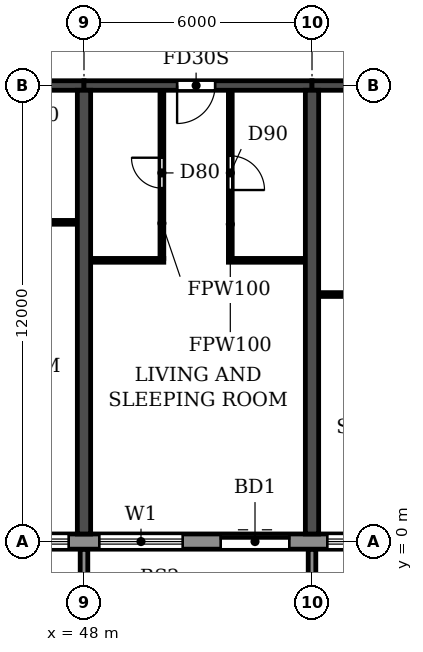
"""IFC4 building model, lengths in metres.
Left out: names, types, materials, properties, quantities, classifications, styles, units other than length and angle.
Written with IfcOpenShell. Run it as: python <this file> out.ifc"""

import sys

from ifc_helpers import new_model, si_unit, direction, frame, frame_2d, origin, place, context, subcontext, project, spatial, polyline, rectangle, outline, extrude, source, transform, mapped, element, fill, save


model = new_model("IFC4")
c1 = context("Model", 3, precision=1e-05, world=origin(), true_north=direction((0.0, 1.0)))
c2 = subcontext(c1, "Body", "Model", "MODEL_VIEW")
j1 = project(units=[si_unit("LENGTHUNIT", "METRE"), si_unit("PLANEANGLEUNIT", "RADIAN")], contexts=[c1])
p1 = place(None, origin())
s1 = spatial("IfcSite", under=j1, at=p1, CompositionType="ELEMENT")
p2 = place(p1, origin())
s2 = spatial("IfcBuilding", under=s1, at=p2, CompositionType="ELEMENT")
p3 = place(p2, frame((0.0, 0.0, 82.8)))
s3 = spatial("IfcBuildingStorey", under=s2, at=p3, CompositionType="ELEMENT", Elevation=82.8)
for number, where, z_axis, x_axis in (
    (1, (48.0, 0.2, 0.0), (0.0, 0.0, 1.0), (0.0, 1.0, 0.0)),
    (2, (54.0, 0.2, 0.0), (0.0, 0.0, 1.0), (0.0, 1.0, 0.0)),
):
    element("IfcWall", number, at=place(p3, frame(where, z_axis=z_axis, x_axis=x_axis)), inside=s3, PredefinedType="SHEAR", context=c2, shape_type="SweptSolid", body=[
        extrude(rectangle(XDim=11.675, YDim=0.35, at=frame_2d((5.837, 0.0))), origin(), (0.0, 0.0, 1.0), 3.06),
    ])
p4 = place(p3, frame((42.0, 12.0, 0.0), z_axis=(0.0, 0.0, 1.0), x_axis=(1.0, 0.0, 0.0)))
e3 = element("IfcWall", 3, at=p4, inside=s3, PredefinedType="SHEAR", context=c2, shape_type="SweptSolid", body=[
    extrude(rectangle(XDim=6.0, YDim=0.25, at=frame_2d((3.0, 0.0))), origin(), (0.0, 0.0, 1.0), 2.46),
])
p5 = place(p4, frame((2.45, 0.0, 0.0)))
e4 = element("IfcOpeningElement", 4, at=p5, cuts=e3, PredefinedType="OPENING", context=c2, shape_type="SweptSolid", body=[
    extrude(rectangle(XDim=1.0, YDim=2.1, at=frame_2d((0.5, 1.05))), frame((0.0, 0.135, 0.0), z_axis=(0.0, -1.0, 0.0), x_axis=(1.0, 0.0, 0.0)), (0.0, 0.0, 1.0), 0.27),
])
p6 = place(p3, frame((48.0, 12.0, 0.0), z_axis=(0.0, 0.0, 1.0), x_axis=(1.0, 0.0, 0.0)))
e5 = element("IfcWall", 5, at=p6, inside=s3, PredefinedType="SHEAR", context=c2, shape_type="SweptSolid", body=[
    extrude(rectangle(XDim=6.0, YDim=0.25, at=frame_2d((3.0, 0.0))), origin(), (0.0, 0.0, 1.0), 2.46),
])
p7 = place(p6, frame((2.45, 0.0, 0.0)))
e6 = element("IfcOpeningElement", 6, at=p7, cuts=e5, PredefinedType="OPENING", context=c2, shape_type="SweptSolid", body=[
    extrude(rectangle(XDim=1.0, YDim=2.1, at=frame_2d((0.5, 1.05))), frame((0.0, 0.135, 0.0), z_axis=(0.0, -1.0, 0.0), x_axis=(1.0, 0.0, 0.0)), (0.0, 0.0, 1.0), 0.27),
])
p8 = place(p3, frame((54.0, 12.0, 0.0), z_axis=(0.0, 0.0, 1.0), x_axis=(1.0, 0.0, 0.0)))
e7 = element("IfcWall", 7, at=p8, inside=s3, PredefinedType="SHEAR", context=c2, shape_type="SweptSolid", body=[
    extrude(rectangle(XDim=6.0, YDim=0.25, at=frame_2d((3.0, 0.0))), origin(), (0.0, 0.0, 1.0), 2.46),
])
p9 = place(p8, frame((2.45, 0.0, 0.0)))
e8 = element("IfcOpeningElement", 8, at=p9, cuts=e7, PredefinedType="OPENING", context=c2, shape_type="SweptSolid", body=[
    extrude(rectangle(XDim=1.0, YDim=2.1, at=frame_2d((0.5, 1.05))), frame((0.0, 0.135, 0.0), z_axis=(0.0, -1.0, 0.0), x_axis=(1.0, 0.0, 0.0)), (0.0, 0.0, 1.0), 0.27),
])
p10 = place(p3, frame((10.683, 0.0, 0.0), z_axis=(0.0, 0.0, 1.0), x_axis=(1.0, 0.0, 0.0)))
e9 = element("IfcWall", 9, at=p10, inside=s3, PredefinedType="STANDARD", context=c2, shape_type="SweptSolid", body=[
    extrude(rectangle(XDim=80.634, YDim=0.4, at=frame_2d((40.317, 0.0))), origin(), (0.0, 0.0, 1.0), 3.06),
])
p11 = place(p10, frame((1.717, 0.0, 0.9)))
e10 = element("IfcOpeningElement", 10, at=p11, cuts=e9, PredefinedType="OPENING", context=c2, shape_type="SweptSolid", body=[
    extrude(rectangle(XDim=2.2, YDim=1.5, at=frame_2d((1.1, 0.75))), frame((0.0, 0.21, 0.0), z_axis=(0.0, -1.0, 0.0), x_axis=(1.0, 0.0, 0.0)), (0.0, 0.0, 1.0), 0.42),
])
p12 = place(p10, frame((4.917, 0.0, 0.0)))
e11 = element("IfcOpeningElement", 11, at=p12, cuts=e9, PredefinedType="OPENING", context=c2, shape_type="SweptSolid", body=[
    extrude(rectangle(XDim=1.8, YDim=2.4, at=frame_2d((0.9, 1.2))), frame((0.0, 0.21, 0.0), z_axis=(0.0, -1.0, 0.0), x_axis=(1.0, 0.0, 0.0)), (0.0, 0.0, 1.0), 0.42),
])
p13 = place(p10, frame((7.717, 0.0, 0.9)))
e12 = element("IfcOpeningElement", 12, at=p13, cuts=e9, PredefinedType="OPENING", context=c2, shape_type="SweptSolid", body=[
    extrude(rectangle(XDim=2.2, YDim=1.5, at=frame_2d((1.1, 0.75))), frame((0.0, 0.21, 0.0), z_axis=(0.0, -1.0, 0.0), x_axis=(1.0, 0.0, 0.0)), (0.0, 0.0, 1.0), 0.42),
])
p14 = place(p10, frame((10.717, 0.0, 0.9)))
e13 = element("IfcOpeningElement", 13, at=p14, cuts=e9, PredefinedType="OPENING", context=c2, shape_type="SweptSolid", body=[
    extrude(rectangle(XDim=2.2, YDim=1.5, at=frame_2d((1.1, 0.75))), frame((0.0, 0.21, 0.0), z_axis=(0.0, -1.0, 0.0), x_axis=(1.0, 0.0, 0.0)), (0.0, 0.0, 1.0), 0.42),
])
p15 = place(p10, frame((13.917, 0.0, 0.0)))
e14 = element("IfcOpeningElement", 14, at=p15, cuts=e9, PredefinedType="OPENING", context=c2, shape_type="SweptSolid", body=[
    extrude(rectangle(XDim=1.8, YDim=2.4, at=frame_2d((0.9, 1.2))), frame((0.0, 0.21, 0.0), z_axis=(0.0, -1.0, 0.0), x_axis=(1.0, 0.0, 0.0)), (0.0, 0.0, 1.0), 0.42),
])
p16 = place(p10, frame((16.717, 0.0, 0.9)))
e15 = element("IfcOpeningElement", 15, at=p16, cuts=e9, PredefinedType="OPENING", context=c2, shape_type="SweptSolid", body=[
    extrude(rectangle(XDim=2.2, YDim=1.5, at=frame_2d((1.1, 0.75))), frame((0.0, 0.21, 0.0), z_axis=(0.0, -1.0, 0.0), x_axis=(1.0, 0.0, 0.0)), (0.0, 0.0, 1.0), 0.42),
])
p17 = place(p10, frame((19.717, 0.0, 0.9)))
e16 = element("IfcOpeningElement", 16, at=p17, cuts=e9, PredefinedType="OPENING", context=c2, shape_type="SweptSolid", body=[
    extrude(rectangle(XDim=2.2, YDim=1.5, at=frame_2d((1.1, 0.75))), frame((0.0, 0.21, 0.0), z_axis=(0.0, -1.0, 0.0), x_axis=(1.0, 0.0, 0.0)), (0.0, 0.0, 1.0), 0.42),
])
p18 = place(p10, frame((22.717, 0.0, 0.9)))
e17 = element("IfcOpeningElement", 17, at=p18, cuts=e9, PredefinedType="OPENING", context=c2, shape_type="SweptSolid", body=[
    extrude(rectangle(XDim=2.2, YDim=1.5, at=frame_2d((1.1, 0.75))), frame((0.0, 0.21, 0.0), z_axis=(0.0, -1.0, 0.0), x_axis=(1.0, 0.0, 0.0)), (0.0, 0.0, 1.0), 0.42),
])
p19 = place(p10, frame((25.917, 0.0, 0.0)))
e18 = element("IfcOpeningElement", 18, at=p19, cuts=e9, PredefinedType="OPENING", context=c2, shape_type="SweptSolid", body=[
    extrude(rectangle(XDim=1.8, YDim=2.4, at=frame_2d((0.9, 1.2))), frame((0.0, 0.21, 0.0), z_axis=(0.0, -1.0, 0.0), x_axis=(1.0, 0.0, 0.0)), (0.0, 0.0, 1.0), 0.42),
])
p20 = place(p10, frame((28.717, 0.0, 0.9)))
e19 = element("IfcOpeningElement", 19, at=p20, cuts=e9, PredefinedType="OPENING", context=c2, shape_type="SweptSolid", body=[
    extrude(rectangle(XDim=2.2, YDim=1.5, at=frame_2d((1.1, 0.75))), frame((0.0, 0.21, 0.0), z_axis=(0.0, -1.0, 0.0), x_axis=(1.0, 0.0, 0.0)), (0.0, 0.0, 1.0), 0.42),
])
p21 = place(p10, frame((31.717, 0.0, 0.9)))
e20 = element("IfcOpeningElement", 20, at=p21, cuts=e9, PredefinedType="OPENING", context=c2, shape_type="SweptSolid", body=[
    extrude(rectangle(XDim=2.2, YDim=1.5, at=frame_2d((1.1, 0.75))), frame((0.0, 0.21, 0.0), z_axis=(0.0, -1.0, 0.0), x_axis=(1.0, 0.0, 0.0)), (0.0, 0.0, 1.0), 0.42),
])
p22 = place(p10, frame((34.717, 0.0, 0.9)))
e21 = element("IfcOpeningElement", 21, at=p22, cuts=e9, PredefinedType="OPENING", context=c2, shape_type="SweptSolid", body=[
    extrude(rectangle(XDim=2.2, YDim=1.5, at=frame_2d((1.1, 0.75))), frame((0.0, 0.21, 0.0), z_axis=(0.0, -1.0, 0.0), x_axis=(1.0, 0.0, 0.0)), (0.0, 0.0, 1.0), 0.42),
])
p23 = place(p10, frame((37.717, 0.0, 0.9)))
e22 = element("IfcOpeningElement", 22, at=p23, cuts=e9, PredefinedType="OPENING", context=c2, shape_type="SweptSolid", body=[
    extrude(rectangle(XDim=2.2, YDim=1.5, at=frame_2d((1.1, 0.75))), frame((0.0, 0.21, 0.0), z_axis=(0.0, -1.0, 0.0), x_axis=(1.0, 0.0, 0.0)), (0.0, 0.0, 1.0), 0.42),
])
p24 = place(p10, frame((40.917, 0.0, 0.0)))
e23 = element("IfcOpeningElement", 23, at=p24, cuts=e9, PredefinedType="OPENING", context=c2, shape_type="SweptSolid", body=[
    extrude(rectangle(XDim=1.8, YDim=2.4, at=frame_2d((0.9, 1.2))), frame((0.0, 0.21, 0.0), z_axis=(0.0, -1.0, 0.0), x_axis=(1.0, 0.0, 0.0)), (0.0, 0.0, 1.0), 0.42),
])
p25 = place(p10, frame((43.717, 0.0, 0.9)))
e24 = element("IfcOpeningElement", 24, at=p25, cuts=e9, PredefinedType="OPENING", context=c2, shape_type="SweptSolid", body=[
    extrude(rectangle(XDim=2.2, YDim=1.5, at=frame_2d((1.1, 0.75))), frame((0.0, 0.21, 0.0), z_axis=(0.0, -1.0, 0.0), x_axis=(1.0, 0.0, 0.0)), (0.0, 0.0, 1.0), 0.42),
])
p26 = place(p10, frame((46.717, 0.0, 0.9)))
e25 = element("IfcOpeningElement", 25, at=p26, cuts=e9, PredefinedType="OPENING", context=c2, shape_type="SweptSolid", body=[
    extrude(rectangle(XDim=2.2, YDim=1.5, at=frame_2d((1.1, 0.75))), frame((0.0, 0.21, 0.0), z_axis=(0.0, -1.0, 0.0), x_axis=(1.0, 0.0, 0.0)), (0.0, 0.0, 1.0), 0.42),
])
p27 = place(p10, frame((49.717, 0.0, 0.9)))
e26 = element("IfcOpeningElement", 26, at=p27, cuts=e9, PredefinedType="OPENING", context=c2, shape_type="SweptSolid", body=[
    extrude(rectangle(XDim=2.2, YDim=1.5, at=frame_2d((1.1, 0.75))), frame((0.0, 0.21, 0.0), z_axis=(0.0, -1.0, 0.0), x_axis=(1.0, 0.0, 0.0)), (0.0, 0.0, 1.0), 0.42),
])
p28 = place(p10, frame((52.917, 0.0, 0.0)))
e27 = element("IfcOpeningElement", 27, at=p28, cuts=e9, PredefinedType="OPENING", context=c2, shape_type="SweptSolid", body=[
    extrude(rectangle(XDim=1.8, YDim=2.4, at=frame_2d((0.9, 1.2))), frame((0.0, 0.21, 0.0), z_axis=(0.0, -1.0, 0.0), x_axis=(1.0, 0.0, 0.0)), (0.0, 0.0, 1.0), 0.42),
])
p29 = place(p10, frame((55.717, 0.0, 0.9)))
e28 = element("IfcOpeningElement", 28, at=p29, cuts=e9, PredefinedType="OPENING", context=c2, shape_type="SweptSolid", body=[
    extrude(rectangle(XDim=2.2, YDim=1.5, at=frame_2d((1.1, 0.75))), frame((0.0, 0.21, 0.0), z_axis=(0.0, -1.0, 0.0), x_axis=(1.0, 0.0, 0.0)), (0.0, 0.0, 1.0), 0.42),
])
p30 = place(p10, frame((58.717, 0.0, 0.9)))
e29 = element("IfcOpeningElement", 29, at=p30, cuts=e9, PredefinedType="OPENING", context=c2, shape_type="SweptSolid", body=[
    extrude(rectangle(XDim=2.2, YDim=1.5, at=frame_2d((1.1, 0.75))), frame((0.0, 0.21, 0.0), z_axis=(0.0, -1.0, 0.0), x_axis=(1.0, 0.0, 0.0)), (0.0, 0.0, 1.0), 0.42),
])
p31 = place(p10, frame((61.717, 0.0, 0.9)))
e30 = element("IfcOpeningElement", 30, at=p31, cuts=e9, PredefinedType="OPENING", context=c2, shape_type="SweptSolid", body=[
    extrude(rectangle(XDim=2.2, YDim=1.5, at=frame_2d((1.1, 0.75))), frame((0.0, 0.21, 0.0), z_axis=(0.0, -1.0, 0.0), x_axis=(1.0, 0.0, 0.0)), (0.0, 0.0, 1.0), 0.42),
])
p32 = place(p10, frame((64.917, 0.0, 0.0)))
e31 = element("IfcOpeningElement", 31, at=p32, cuts=e9, PredefinedType="OPENING", context=c2, shape_type="SweptSolid", body=[
    extrude(rectangle(XDim=1.8, YDim=2.4, at=frame_2d((0.9, 1.2))), frame((0.0, 0.21, 0.0), z_axis=(0.0, -1.0, 0.0), x_axis=(1.0, 0.0, 0.0)), (0.0, 0.0, 1.0), 0.42),
])
p33 = place(p10, frame((67.717, 0.0, 0.9)))
e32 = element("IfcOpeningElement", 32, at=p33, cuts=e9, PredefinedType="OPENING", context=c2, shape_type="SweptSolid", body=[
    extrude(rectangle(XDim=2.2, YDim=1.5, at=frame_2d((1.1, 0.75))), frame((0.0, 0.21, 0.0), z_axis=(0.0, -1.0, 0.0), x_axis=(1.0, 0.0, 0.0)), (0.0, 0.0, 1.0), 0.42),
])
p34 = place(p10, frame((70.717, 0.0, 0.9)))
e33 = element("IfcOpeningElement", 33, at=p34, cuts=e9, PredefinedType="OPENING", context=c2, shape_type="SweptSolid", body=[
    extrude(rectangle(XDim=2.2, YDim=1.5, at=frame_2d((1.1, 0.75))), frame((0.0, 0.21, 0.0), z_axis=(0.0, -1.0, 0.0), x_axis=(1.0, 0.0, 0.0)), (0.0, 0.0, 1.0), 0.42),
])
p35 = place(p10, frame((73.917, 0.0, 0.0)))
e34 = element("IfcOpeningElement", 34, at=p35, cuts=e9, PredefinedType="OPENING", context=c2, shape_type="SweptSolid", body=[
    extrude(rectangle(XDim=1.8, YDim=2.4, at=frame_2d((0.9, 1.2))), frame((0.0, 0.21, 0.0), z_axis=(0.0, -1.0, 0.0), x_axis=(1.0, 0.0, 0.0)), (0.0, 0.0, 1.0), 0.42),
])
p36 = place(p10, frame((76.717, 0.0, 0.9)))
e35 = element("IfcOpeningElement", 35, at=p36, cuts=e9, PredefinedType="OPENING", context=c2, shape_type="SweptSolid", body=[
    extrude(rectangle(XDim=2.2, YDim=1.5, at=frame_2d((1.1, 0.75))), frame((0.0, 0.21, 0.0), z_axis=(0.0, -1.0, 0.0), x_axis=(1.0, 0.0, 0.0)), (0.0, 0.0, 1.0), 0.42),
])
m1 = source(origin(), c2, "Body", "SweptSolid", [
    extrude(outline(polyline([(0.0, 0.0), (0.2, 0.0), (0.2, 1.65), (0.0, 1.65), (0.0, 0.0)])), origin(), (0.0, 0.0, 1.0), 3.1),
])
for number, where in (
    (36, (47.9, -1.85, 0.0)),
    (37, (53.9, -1.85, 0.0)),
):
    element("IfcWall", number, at=place(p3, frame(where)), inside=s3, PredefinedType="STANDARD", context=c2, shape_type="MappedRepresentation", body=[
        mapped(m1, transform((0.0, 0.0, 0.0))),
    ])
for number, where, z_axis, x_axis in (
    (38, (54.185, 6.5, 0.0), (0.0, 0.0, 1.0), (1.0, 0.0, 0.0)),
    (39, (48.185, 7.4, 0.0), (0.0, 0.0, 1.0), (1.0, 0.0, 0.0)),
):
    element("IfcWall", number, at=place(p3, frame(where, z_axis=z_axis, x_axis=x_axis)), inside=s3, PredefinedType="PARTITIONING", context=c2, shape_type="SweptSolid", body=[
        extrude(rectangle(XDim=1.915, YDim=0.1, at=frame_2d((0.958, 0.0))), origin(), (0.0, 0.0, 1.0), 3.06),
    ])
for number, where, z_axis, x_axis in (
    (40, (51.8, 7.4, 0.0), (0.0, 0.0, 1.0), (1.0, 0.0, 0.0)),
    (41, (45.8, 8.4, 0.0), (0.0, 0.0, 1.0), (1.0, 0.0, 0.0)),
):
    element("IfcWall", number, at=place(p3, frame(where, z_axis=z_axis, x_axis=x_axis)), inside=s3, PredefinedType="PARTITIONING", context=c2, shape_type="SweptSolid", body=[
        extrude(rectangle(XDim=2.015, YDim=0.1, at=frame_2d((1.007, 0.0))), origin(), (0.0, 0.0, 1.0), 3.06),
    ])
p37 = place(p3, frame((50.05, 7.45, 0.0), z_axis=(0.0, 0.0, 1.0), x_axis=(0.0, 1.0, 0.0)))
e42 = element("IfcWall", 42, at=p37, inside=s3, PredefinedType="PARTITIONING", context=c2, shape_type="SweptSolid", body=[
    extrude(rectangle(XDim=4.415, YDim=0.1, at=frame_2d((2.208, 0.0))), origin(), (0.0, 0.0, 1.0), 3.06),
])
p38 = place(p37, frame((1.85, 0.0, 0.0)))
e43 = element("IfcOpeningElement", 43, at=p38, cuts=e42, PredefinedType="OPENING", context=c2, shape_type="SweptSolid", body=[
    extrude(rectangle(XDim=0.8, YDim=2.1, at=frame_2d((0.4, 1.05))), frame((0.0, 0.06, 0.0), z_axis=(0.0, -1.0, 0.0), x_axis=(1.0, 0.0, 0.0)), (0.0, 0.0, 1.0), 0.12),
])
p39 = place(p3, frame((51.85, 7.45, 0.0), z_axis=(0.0, 0.0, 1.0), x_axis=(0.0, 1.0, 0.0)))
e44 = element("IfcWall", 44, at=p39, inside=s3, PredefinedType="PARTITIONING", context=c2, shape_type="SweptSolid", body=[
    extrude(rectangle(XDim=4.415, YDim=0.1, at=frame_2d((2.208, 0.0))), origin(), (0.0, 0.0, 1.0), 3.06),
])
p40 = place(p39, frame((1.8, 0.0, 0.0)))
e45 = element("IfcOpeningElement", 45, at=p40, cuts=e44, PredefinedType="OPENING", context=c2, shape_type="SweptSolid", body=[
    extrude(rectangle(XDim=0.9, YDim=2.1, at=frame_2d((0.45, 1.05))), frame((0.0, 0.06, 0.0), z_axis=(0.0, -1.0, 0.0), x_axis=(1.0, 0.0, 0.0)), (0.0, 0.0, 1.0), 0.12),
])
p41 = place(p22, origin())
e46 = element("IfcWindow", 46, at=p41, inside=s3, PartitioningType="DOUBLE_PANEL_HORIZONTAL", PredefinedType="WINDOW", context=c2, shape_type="SweptSolid", body=[
    extrude(rectangle(XDim=2.2, YDim=1.5, at=frame_2d((1.1, 0.75))), frame((0.0, 0.03, 0.0), z_axis=(0.0, -1.0, 0.0), x_axis=(1.0, 0.0, 0.0)), (0.0, 0.0, 1.0), 0.06),
])
fill(e21, e46)
p42 = place(p23, origin())
e47 = element("IfcWindow", 47, at=p42, inside=s3, PartitioningType="DOUBLE_PANEL_HORIZONTAL", PredefinedType="WINDOW", context=c2, shape_type="SweptSolid", body=[
    extrude(rectangle(XDim=2.2, YDim=1.5, at=frame_2d((1.1, 0.75))), frame((0.0, 0.03, 0.0), z_axis=(0.0, -1.0, 0.0), x_axis=(1.0, 0.0, 0.0)), (0.0, 0.0, 1.0), 0.06),
])
fill(e22, e47)
p43 = place(p24, origin())
e48 = element("IfcDoor", 48, at=p43, inside=s3, OperationType="DOUBLE_DOOR_SLIDING", PredefinedType="DOOR", context=c2, shape_type="SweptSolid", body=[
    extrude(rectangle(XDim=1.8, YDim=2.4, at=frame_2d((0.9, 1.2))), frame((0.0, 0.025, 0.0), z_axis=(0.0, -1.0, 0.0), x_axis=(1.0, 0.0, 0.0)), (0.0, 0.0, 1.0), 0.05),
])
fill(e23, e48)
p44 = place(p25, origin())
e49 = element("IfcWindow", 49, at=p44, inside=s3, PartitioningType="DOUBLE_PANEL_HORIZONTAL", PredefinedType="WINDOW", context=c2, shape_type="SweptSolid", body=[
    extrude(rectangle(XDim=2.2, YDim=1.5, at=frame_2d((1.1, 0.75))), frame((0.0, 0.03, 0.0), z_axis=(0.0, -1.0, 0.0), x_axis=(1.0, 0.0, 0.0)), (0.0, 0.0, 1.0), 0.06),
])
fill(e24, e49)
p45 = place(p38, origin())
e50 = element("IfcDoor", 50, at=p45, inside=s3, OperationType="SINGLE_SWING_RIGHT", PredefinedType="DOOR", context=c2, shape_type="SweptSolid", body=[
    extrude(rectangle(XDim=0.8, YDim=2.1, at=frame_2d((0.4, 1.05))), frame((0.0, 0.025, 0.0), z_axis=(0.0, -1.0, 0.0), x_axis=(1.0, 0.0, 0.0)), (0.0, 0.0, 1.0), 0.05),
])
fill(e43, e50)
p46 = place(p7, frame((1.0, 0.0, 0.0), z_axis=(0.0, 0.0, 1.0), x_axis=(-1.0, 0.0, 0.0)))
e51 = element("IfcDoor", 51, at=p46, inside=s3, OperationType="SINGLE_SWING_RIGHT", PredefinedType="DOOR", context=c2, shape_type="SweptSolid", body=[
    extrude(rectangle(XDim=1.0, YDim=2.1, at=frame_2d((0.5, 1.05))), frame((0.0, 0.025, 0.0), z_axis=(0.0, -1.0, 0.0), x_axis=(1.0, 0.0, 0.0)), (0.0, 0.0, 1.0), 0.05),
])
fill(e6, e51)
p47 = place(p40, frame((0.9, 0.0, 0.0), z_axis=(0.0, 0.0, 1.0), x_axis=(-1.0, 0.0, 0.0)))
e52 = element("IfcDoor", 52, at=p47, inside=s3, OperationType="SINGLE_SWING_RIGHT", PredefinedType="DOOR", context=c2, shape_type="SweptSolid", body=[
    extrude(rectangle(XDim=0.9, YDim=2.1, at=frame_2d((0.45, 1.05))), frame((0.0, 0.025, 0.0), z_axis=(0.0, -1.0, 0.0), x_axis=(1.0, 0.0, 0.0)), (0.0, 0.0, 1.0), 0.05),
])
fill(e45, e52)
save(model, sys.argv[1])
